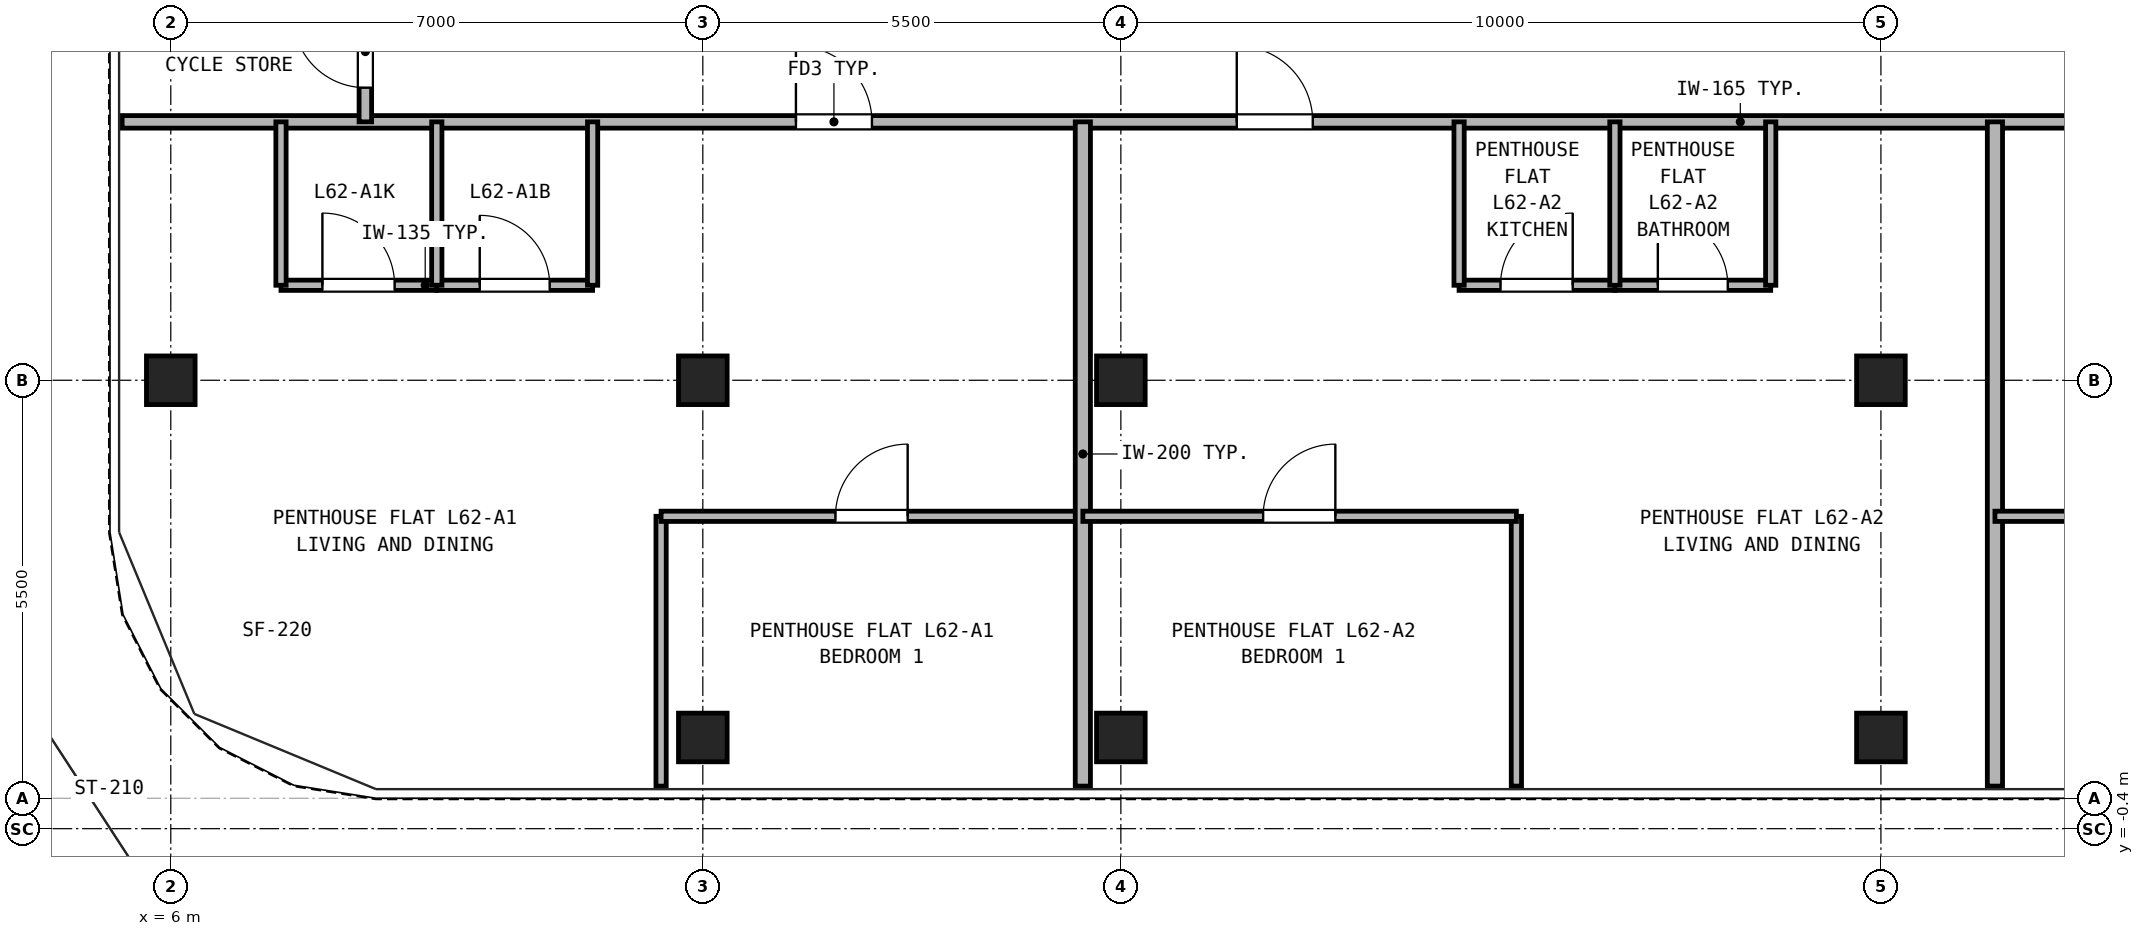
"""IFC4 building model, lengths in metres.
Left out: names, types, materials, properties, quantities, classifications, styles, units other than length and angle.
Written with IfcOpenShell. Run it as: python <this file> out.ifc"""

import sys

from ifc_helpers import new_model, si_unit, direction, frame, frame_2d, origin, origin_2d, place, context, subcontext, project, spatial, rectangle, hollow_rectangle, extrude, source, transform, mapped, element, fill, save


model = new_model("IFC4")
c1 = context("Model", 3, precision=1e-05, world=origin(), true_north=direction((0.0, 1.0)))
c2 = subcontext(c1, "Body", "Model", "MODEL_VIEW")
j1 = project(units=[si_unit("LENGTHUNIT", "METRE"), si_unit("PLANEANGLEUNIT", "RADIAN")], contexts=[c1])
p1 = place(None, origin())
s1 = spatial("IfcSite", under=j1, at=p1, CompositionType="ELEMENT")
p2 = place(p1, origin())
s2 = spatial("IfcBuilding", under=s1, at=p2, CompositionType="ELEMENT")
p3 = place(p2, frame((0.0, 0.0, 220.1)))
s3 = spatial("IfcBuildingStorey", under=s2, at=p3, CompositionType="ELEMENT", Elevation=220.1)
m1 = source(origin(), c2, "Body", "SweptSolid", [
    extrude(hollow_rectangle(XDim=0.64, YDim=0.64, WallThickness=0.035, at=origin_2d()), origin(), (0.0, 0.0, 1.0), 2.98),
])
for number, where, z_axis, x_axis in (
    (1, (13.0, 0.8, 0.0), (0.0, 0.0, 1.0), (1.0, 0.0, 0.0)),
    (2, (18.5, 0.8, 0.0), (0.0, 0.0, 1.0), (1.0, 0.0, 0.0)),
    (3, (28.5, 0.8, 0.0), (0.0, 0.0, 1.0), (1.0, 0.0, 0.0)),
    (4, (6.0, 5.5, 0.0), (0.0, 0.0, 1.0), (1.0, 0.0, 0.0)),
    (5, (13.0, 5.5, 0.0), (0.0, 0.0, 1.0), (1.0, 0.0, 0.0)),
    (6, (18.5, 5.5, 0.0), (0.0, 0.0, 1.0), (1.0, 0.0, 0.0)),
    (7, (28.5, 5.5, 0.0), (0.0, 0.0, 1.0), (1.0, 0.0, 0.0)),
):
    element("IfcColumn", number, at=place(p3, frame(where, z_axis=z_axis, x_axis=x_axis)), inside=s3, PredefinedType="COLUMN", context=c2, shape_type="MappedRepresentation", body=[
        mapped(m1, transform((0.0, 0.0, 0.0), x_axis=(1.0, 0.0, 0.0), y_axis=(0.0, 1.0, 0.0), z_axis=(0.0, 0.0, 1.0), scale=1.0)),
    ])
p4 = place(p3, frame((5.36, 8.9, 0.0), z_axis=(0.0, 0.0, 1.0), x_axis=(1.0, 0.0, 0.0)))
e8 = element("IfcWall", 8, at=p4, inside=s3, PredefinedType="PARTITIONING", context=c2, shape_type="SweptSolid", body=[
    extrude(rectangle(XDim=36.28, YDim=0.165, at=frame_2d((18.14, 0.0))), origin(), (0.0, 0.0, 1.0), 2.98),
])
p5 = place(p4, frame((8.865, 0.0, 0.0)))
e9 = element("IfcOpeningElement", 9, at=p5, cuts=e8, PredefinedType="OPENING", context=c2, shape_type="SweptSolid", body=[
    extrude(rectangle(XDim=1.0, YDim=2.15, at=frame_2d((0.5, 1.075))), frame((0.0, 0.093, 0.0), z_axis=(0.0, -1.0, 0.0), x_axis=(1.0, 0.0, 0.0)), (0.0, 0.0, 1.0), 0.185),
])
p6 = place(p4, frame((14.665, 0.0, 0.0)))
e10 = element("IfcOpeningElement", 10, at=p6, cuts=e8, PredefinedType="OPENING", context=c2, shape_type="SweptSolid", body=[
    extrude(rectangle(XDim=1.0, YDim=2.15, at=frame_2d((0.5, 1.075))), frame((0.0, 0.093, 0.0), z_axis=(0.0, -1.0, 0.0), x_axis=(1.0, 0.0, 0.0)), (0.0, 0.0, 1.0), 0.185),
])
p7 = place(p4, frame((26.915, 0.0, 0.0)))
e11 = element("IfcOpeningElement", 11, at=p7, cuts=e8, PredefinedType="OPENING", context=c2, shape_type="SweptSolid", body=[
    extrude(rectangle(XDim=1.0, YDim=2.15, at=frame_2d((0.5, 1.075))), frame((0.0, 0.093, 0.0), z_axis=(0.0, -1.0, 0.0), x_axis=(1.0, 0.0, 0.0)), (0.0, 0.0, 1.0), 0.185),
])
p8 = place(p3, frame((8.56, 8.9, 0.0), z_axis=(0.0, 0.0, 1.0), x_axis=(0.0, 1.0, 0.0)))
e12 = element("IfcWall", 12, at=p8, inside=s3, PredefinedType="PARTITIONING", context=c2, shape_type="SweptSolid", body=[
    extrude(rectangle(XDim=2.0, YDim=0.165, at=frame_2d((1.0, 0.0))), origin(), (0.0, 0.0, 1.0), 2.98),
])
p9 = place(p8, frame((0.45, 0.0, 0.0)))
e13 = element("IfcOpeningElement", 13, at=p9, cuts=e12, PredefinedType="OPENING", context=c2, shape_type="SweptSolid", body=[
    extrude(rectangle(XDim=0.95, YDim=2.15, at=frame_2d((0.475, 1.075))), frame((0.0, 0.093, 0.0), z_axis=(0.0, -1.0, 0.0), x_axis=(1.0, 0.0, 0.0)), (0.0, 0.0, 1.0), 0.185),
])
p10 = place(p3, frame((7.45, 6.75, 0.0), z_axis=(0.0, 0.0, 1.0), x_axis=(1.0, 0.0, 0.0)))
e14 = element("IfcWall", 14, at=p10, inside=s3, PredefinedType="PARTITIONING", context=c2, shape_type="SweptSolid", body=[
    extrude(rectangle(XDim=2.05, YDim=0.135, at=frame_2d((1.025, 0.0))), origin(), (0.0, 0.0, 1.0), 2.98),
])
p11 = place(p10, frame((0.545, 0.0, 0.0)))
e15 = element("IfcOpeningElement", 15, at=p11, cuts=e14, PredefinedType="OPENING", context=c2, shape_type="SweptSolid", body=[
    extrude(rectangle(XDim=0.95, YDim=2.15, at=frame_2d((0.475, 1.075))), frame((0.0, 0.077, 0.0), z_axis=(0.0, -1.0, 0.0), x_axis=(1.0, 0.0, 0.0)), (0.0, 0.0, 1.0), 0.155),
])
p12 = place(p3, frame((9.5, 6.75, 0.0), z_axis=(0.0, 0.0, 1.0), x_axis=(1.0, 0.0, 0.0)))
e16 = element("IfcWall", 16, at=p12, inside=s3, PredefinedType="PARTITIONING", context=c2, shape_type="SweptSolid", body=[
    extrude(rectangle(XDim=2.05, YDim=0.135, at=frame_2d((1.025, 0.0))), origin(), (0.0, 0.0, 1.0), 2.98),
])
p13 = place(p12, frame((0.565, 0.0, 0.0)))
e17 = element("IfcOpeningElement", 17, at=p13, cuts=e16, PredefinedType="OPENING", context=c2, shape_type="SweptSolid", body=[
    extrude(rectangle(XDim=0.92, YDim=2.1, at=frame_2d((0.46, 1.05))), frame((0.0, 0.077, 0.0), z_axis=(0.0, -1.0, 0.0), x_axis=(1.0, 0.0, 0.0)), (0.0, 0.0, 1.0), 0.155),
])
for number, where, z_axis, x_axis in (
    (18, (7.45, 6.75, 0.0), (0.0, 0.0, 1.0), (0.0, 1.0, 0.0)),
    (19, (9.5, 6.75, 0.0), (0.0, 0.0, 1.0), (0.0, 1.0, 0.0)),
    (20, (11.55, 6.75, 0.0), (0.0, 0.0, 1.0), (0.0, 1.0, 0.0)),
):
    element("IfcWall", number, at=place(p3, frame(where, z_axis=z_axis, x_axis=x_axis)), inside=s3, PredefinedType="PARTITIONING", context=c2, shape_type="SweptSolid", body=[
        extrude(rectangle(XDim=2.15, YDim=0.135, at=frame_2d((1.075, 0.0))), origin(), (0.0, 0.0, 1.0), 2.98),
    ])
p14 = place(p3, frame((12.451, 0.16, 0.0), z_axis=(0.0, 0.0, 1.0), x_axis=(0.0, 1.0, 0.0)))
e21 = element("IfcWall", 21, at=p14, inside=s3, PredefinedType="PARTITIONING", context=c2, shape_type="SweptSolid", body=[
    extrude(rectangle(XDim=3.55, YDim=0.135, at=frame_2d((1.775, 0.0))), origin(), (0.0, 0.0, 1.0), 2.98),
])
p15 = place(p3, frame((12.451, 3.71, 0.0), z_axis=(0.0, 0.0, 1.0), x_axis=(1.0, 0.0, 0.0)))
e22 = element("IfcWall", 22, at=p15, inside=s3, PredefinedType="PARTITIONING", context=c2, shape_type="SweptSolid", body=[
    extrude(rectangle(XDim=5.549, YDim=0.135, at=frame_2d((2.774, 0.0))), origin(), (0.0, 0.0, 1.0), 2.98),
])
p16 = place(p15, frame((2.294, 0.0, 0.0)))
e23 = element("IfcOpeningElement", 23, at=p16, cuts=e22, PredefinedType="OPENING", context=c2, shape_type="SweptSolid", body=[
    extrude(rectangle(XDim=0.95, YDim=2.15, at=frame_2d((0.475, 1.075))), frame((0.0, 0.077, 0.0), z_axis=(0.0, -1.0, 0.0), x_axis=(1.0, 0.0, 0.0)), (0.0, 0.0, 1.0), 0.155),
])
p17 = place(p3, frame((18.0, 0.16, 0.0), z_axis=(0.0, 0.0, 1.0), x_axis=(0.0, 1.0, 0.0)))
e24 = element("IfcWall", 24, at=p17, inside=s3, PredefinedType="PARTITIONING", context=c2, shape_type="SweptSolid", body=[
    extrude(rectangle(XDim=8.74, YDim=0.2, at=frame_2d((4.37, 0.0))), origin(), (0.0, 0.0, 1.0), 2.98),
])
p18 = place(p3, frame((22.95, 6.75, 0.0), z_axis=(0.0, 0.0, 1.0), x_axis=(1.0, 0.0, 0.0)))
e25 = element("IfcWall", 25, at=p18, inside=s3, PredefinedType="PARTITIONING", context=c2, shape_type="SweptSolid", body=[
    extrude(rectangle(XDim=2.05, YDim=0.135, at=frame_2d((1.025, 0.0))), origin(), (0.0, 0.0, 1.0), 2.98),
])
p19 = place(p18, frame((0.545, 0.0, 0.0)))
e26 = element("IfcOpeningElement", 26, at=p19, cuts=e25, PredefinedType="OPENING", context=c2, shape_type="SweptSolid", body=[
    extrude(rectangle(XDim=0.95, YDim=2.15, at=frame_2d((0.475, 1.075))), frame((0.0, 0.077, 0.0), z_axis=(0.0, -1.0, 0.0), x_axis=(1.0, 0.0, 0.0)), (0.0, 0.0, 1.0), 0.155),
])
p20 = place(p3, frame((25.0, 6.75, 0.0), z_axis=(0.0, 0.0, 1.0), x_axis=(1.0, 0.0, 0.0)))
e27 = element("IfcWall", 27, at=p20, inside=s3, PredefinedType="PARTITIONING", context=c2, shape_type="SweptSolid", body=[
    extrude(rectangle(XDim=2.05, YDim=0.135, at=frame_2d((1.025, 0.0))), origin(), (0.0, 0.0, 1.0), 2.98),
])
p21 = place(p20, frame((0.565, 0.0, 0.0)))
e28 = element("IfcOpeningElement", 28, at=p21, cuts=e27, PredefinedType="OPENING", context=c2, shape_type="SweptSolid", body=[
    extrude(rectangle(XDim=0.92, YDim=2.1, at=frame_2d((0.46, 1.05))), frame((0.0, 0.077, 0.0), z_axis=(0.0, -1.0, 0.0), x_axis=(1.0, 0.0, 0.0)), (0.0, 0.0, 1.0), 0.155),
])
for number, where, z_axis, x_axis in (
    (29, (22.95, 6.75, 0.0), (0.0, 0.0, 1.0), (0.0, 1.0, 0.0)),
    (30, (25.0, 6.75, 0.0), (0.0, 0.0, 1.0), (0.0, 1.0, 0.0)),
    (31, (27.05, 6.75, 0.0), (0.0, 0.0, 1.0), (0.0, 1.0, 0.0)),
):
    element("IfcWall", number, at=place(p3, frame(where, z_axis=z_axis, x_axis=x_axis)), inside=s3, PredefinedType="PARTITIONING", context=c2, shape_type="SweptSolid", body=[
        extrude(rectangle(XDim=2.15, YDim=0.135, at=frame_2d((1.075, 0.0))), origin(), (0.0, 0.0, 1.0), 2.98),
    ])
p22 = place(p3, frame((23.704, 0.16, 0.0), z_axis=(0.0, 0.0, 1.0), x_axis=(0.0, 1.0, 0.0)))
e32 = element("IfcWall", 32, at=p22, inside=s3, PredefinedType="PARTITIONING", context=c2, shape_type="SweptSolid", body=[
    extrude(rectangle(XDim=3.55, YDim=0.135, at=frame_2d((1.775, 0.0))), origin(), (0.0, 0.0, 1.0), 2.98),
])
p23 = place(p3, frame((18.0, 3.71, 0.0), z_axis=(0.0, 0.0, 1.0), x_axis=(1.0, 0.0, 0.0)))
e33 = element("IfcWall", 33, at=p23, inside=s3, PredefinedType="PARTITIONING", context=c2, shape_type="SweptSolid", body=[
    extrude(rectangle(XDim=5.704, YDim=0.135, at=frame_2d((2.852, 0.0))), origin(), (0.0, 0.0, 1.0), 2.98),
])
p24 = place(p23, frame((2.372, 0.0, 0.0)))
e34 = element("IfcOpeningElement", 34, at=p24, cuts=e33, PredefinedType="OPENING", context=c2, shape_type="SweptSolid", body=[
    extrude(rectangle(XDim=0.95, YDim=2.15, at=frame_2d((0.475, 1.075))), frame((0.0, 0.077, 0.0), z_axis=(0.0, -1.0, 0.0), x_axis=(1.0, 0.0, 0.0)), (0.0, 0.0, 1.0), 0.155),
])
p25 = place(p3, frame((30.0, 0.16, 0.0), z_axis=(0.0, 0.0, 1.0), x_axis=(0.0, 1.0, 0.0)))
e35 = element("IfcWall", 35, at=p25, inside=s3, PredefinedType="PARTITIONING", context=c2, shape_type="SweptSolid", body=[
    extrude(rectangle(XDim=8.74, YDim=0.2, at=frame_2d((4.37, 0.0))), origin(), (0.0, 0.0, 1.0), 2.98),
])
p26 = place(p3, frame((30.0, 3.71, 0.0), z_axis=(0.0, 0.0, 1.0), x_axis=(1.0, 0.0, 0.0)))
e36 = element("IfcWall", 36, at=p26, inside=s3, PredefinedType="PARTITIONING", context=c2, shape_type="SweptSolid", body=[
    extrude(rectangle(XDim=4.929, YDim=0.135, at=frame_2d((2.464, 0.0))), origin(), (0.0, 0.0, 1.0), 2.98),
])
p27 = place(p26, frame((1.985, 0.0, 0.0)))
e37 = element("IfcOpeningElement", 37, at=p27, cuts=e36, PredefinedType="OPENING", context=c2, shape_type="SweptSolid", body=[
    extrude(rectangle(XDim=0.95, YDim=2.15, at=frame_2d((0.475, 1.075))), frame((0.0, 0.077, 0.0), z_axis=(0.0, -1.0, 0.0), x_axis=(1.0, 0.0, 0.0)), (0.0, 0.0, 1.0), 0.155),
])
p28 = place(p11, origin())
e38 = element("IfcDoor", 38, at=p28, inside=s3, OperationType="SINGLE_SWING_LEFT", PredefinedType="DOOR", context=c2, shape_type="SweptSolid", body=[
    extrude(rectangle(XDim=0.95, YDim=2.15, at=frame_2d((0.475, 1.075))), frame((0.0, 0.025, 0.0), z_axis=(0.0, -1.0, 0.0), x_axis=(1.0, 0.0, 0.0)), (0.0, 0.0, 1.0), 0.05),
])
fill(e15, e38)
p29 = place(p13, origin())
e39 = element("IfcDoor", 39, at=p29, inside=s3, OperationType="SINGLE_SWING_LEFT", PredefinedType="DOOR", context=c2, shape_type="SweptSolid", body=[
    extrude(rectangle(XDim=0.92, YDim=2.1, at=frame_2d((0.46, 1.05))), frame((0.0, 0.025, 0.0), z_axis=(0.0, -1.0, 0.0), x_axis=(1.0, 0.0, 0.0)), (0.0, 0.0, 1.0), 0.05),
])
fill(e17, e39)
p30 = place(p16, frame((0.95, 0.0, 0.0), z_axis=(0.0, 0.0, 1.0), x_axis=(-1.0, 0.0, 0.0)))
e40 = element("IfcDoor", 40, at=p30, inside=s3, OperationType="SINGLE_SWING_RIGHT", PredefinedType="DOOR", context=c2, shape_type="SweptSolid", body=[
    extrude(rectangle(XDim=0.95, YDim=2.15, at=frame_2d((0.475, 1.075))), frame((0.0, 0.025, 0.0), z_axis=(0.0, -1.0, 0.0), x_axis=(1.0, 0.0, 0.0)), (0.0, 0.0, 1.0), 0.05),
])
fill(e23, e40)
p31 = place(p5, frame((1.0, 0.0, 0.0), z_axis=(0.0, 0.0, 1.0), x_axis=(-1.0, 0.0, 0.0)))
e41 = element("IfcDoor", 41, at=p31, inside=s3, OperationType="SINGLE_SWING_LEFT", PredefinedType="DOOR", context=c2, shape_type="SweptSolid", body=[
    extrude(rectangle(XDim=1.0, YDim=2.15, at=frame_2d((0.5, 1.075))), frame((0.0, 0.025, 0.0), z_axis=(0.0, -1.0, 0.0), x_axis=(1.0, 0.0, 0.0)), (0.0, 0.0, 1.0), 0.05),
])
fill(e9, e41)
p32 = place(p19, origin())
e42 = element("IfcDoor", 42, at=p32, inside=s3, OperationType="SINGLE_SWING_RIGHT", PredefinedType="DOOR", context=c2, shape_type="SweptSolid", body=[
    extrude(rectangle(XDim=0.95, YDim=2.15, at=frame_2d((0.475, 1.075))), frame((0.0, 0.025, 0.0), z_axis=(0.0, -1.0, 0.0), x_axis=(1.0, 0.0, 0.0)), (0.0, 0.0, 1.0), 0.05),
])
fill(e26, e42)
p33 = place(p21, origin())
e43 = element("IfcDoor", 43, at=p33, inside=s3, OperationType="SINGLE_SWING_LEFT", PredefinedType="DOOR", context=c2, shape_type="SweptSolid", body=[
    extrude(rectangle(XDim=0.92, YDim=2.1, at=frame_2d((0.46, 1.05))), frame((0.0, 0.025, 0.0), z_axis=(0.0, -1.0, 0.0), x_axis=(1.0, 0.0, 0.0)), (0.0, 0.0, 1.0), 0.05),
])
fill(e28, e43)
p34 = place(p24, frame((0.95, 0.0, 0.0), z_axis=(0.0, 0.0, 1.0), x_axis=(-1.0, 0.0, 0.0)))
e44 = element("IfcDoor", 44, at=p34, inside=s3, OperationType="SINGLE_SWING_RIGHT", PredefinedType="DOOR", context=c2, shape_type="SweptSolid", body=[
    extrude(rectangle(XDim=0.95, YDim=2.15, at=frame_2d((0.475, 1.075))), frame((0.0, 0.025, 0.0), z_axis=(0.0, -1.0, 0.0), x_axis=(1.0, 0.0, 0.0)), (0.0, 0.0, 1.0), 0.05),
])
fill(e34, e44)
p35 = place(p6, frame((1.0, 0.0, 0.0), z_axis=(0.0, 0.0, 1.0), x_axis=(-1.0, 0.0, 0.0)))
e45 = element("IfcDoor", 45, at=p35, inside=s3, OperationType="SINGLE_SWING_LEFT", PredefinedType="DOOR", context=c2, shape_type="SweptSolid", body=[
    extrude(rectangle(XDim=1.0, YDim=2.15, at=frame_2d((0.5, 1.075))), frame((0.0, 0.025, 0.0), z_axis=(0.0, -1.0, 0.0), x_axis=(1.0, 0.0, 0.0)), (0.0, 0.0, 1.0), 0.05),
])
fill(e10, e45)
p36 = place(p9, frame((0.95, 0.0, 0.0), z_axis=(0.0, 0.0, 1.0), x_axis=(-1.0, 0.0, 0.0)))
e46 = element("IfcDoor", 46, at=p36, inside=s3, OperationType="SINGLE_SWING_RIGHT", PredefinedType="DOOR", context=c2, shape_type="SweptSolid", body=[
    extrude(rectangle(XDim=0.95, YDim=2.15, at=frame_2d((0.475, 1.075))), frame((0.0, 0.025, 0.0), z_axis=(0.0, -1.0, 0.0), x_axis=(1.0, 0.0, 0.0)), (0.0, 0.0, 1.0), 0.05),
])
fill(e13, e46)
save(model, sys.argv[1])
